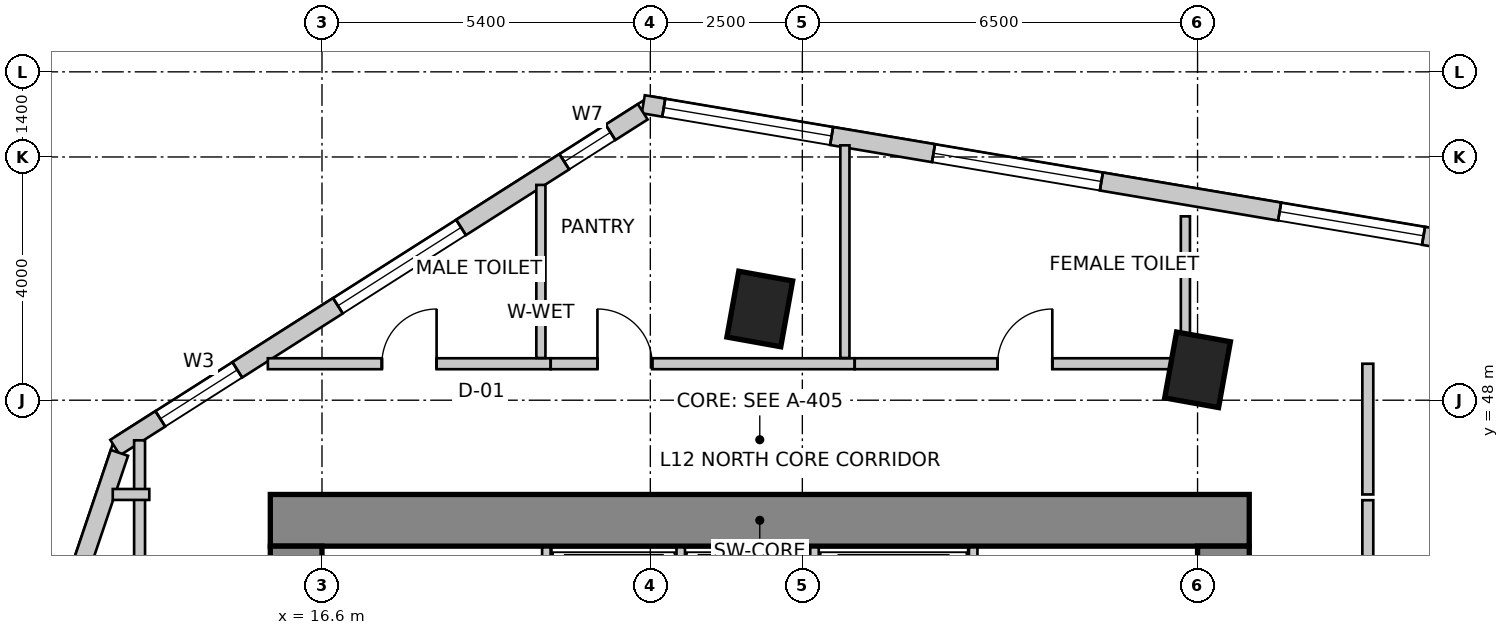
"""IFC4 building model, lengths in metres.
Left out: names, types, materials, properties, quantities, classifications, styles, units other than length and angle.
Written with IfcOpenShell. Run it as: python <this file> out.ifc"""

import sys

from ifc_helpers import new_model, si_unit, direction, frame, frame_2d, origin, origin_2d, place, context, subcontext, project, spatial, rectangle, extrude, source, transform, mapped, element, fill, save


model = new_model("IFC4")
c1 = context("Model", 3, precision=1e-05, world=origin(), true_north=direction((0.0, 1.0)))
c2 = subcontext(c1, "Body", "Model", "MODEL_VIEW")
j1 = project(units=[si_unit("LENGTHUNIT", "METRE"), si_unit("PLANEANGLEUNIT", "RADIAN")], contexts=[c1])
p1 = place(None, origin())
s1 = spatial("IfcSite", under=j1, at=p1, CompositionType="ELEMENT")
p2 = place(p1, origin())
s2 = spatial("IfcBuilding", under=s1, at=p2, CompositionType="ELEMENT")
p3 = place(p2, frame((0.0, 0.0, 51.0)))
s3 = spatial("IfcBuildingStorey", under=s2, at=p3, CompositionType="ELEMENT", Elevation=51.0)
p4 = place(p3, frame((15.75, 46.025, 0.0), z_axis=(0.0, 0.0, 1.0), x_axis=(1.0, 0.0, 0.0)))
e1 = element("IfcWall", 1, at=p4, inside=s3, PredefinedType="SHEAR", context=c2, shape_type="SweptSolid", body=[
    extrude(rectangle(XDim=16.1, YDim=0.85, at=frame_2d((8.05, 0.0))), origin(), (0.0, 0.0, 1.0), 4.0),
])
p5 = place(p3, frame((16.175, 34.2, 0.0), z_axis=(0.0, 0.0, 1.0), x_axis=(0.0, 1.0, 0.0)))
e2 = element("IfcWall", 2, at=p5, inside=s3, PredefinedType="SHEAR", context=c2, shape_type="SweptSolid", body=[
    extrude(rectangle(XDim=11.4, YDim=0.85, at=frame_2d((5.7, 0.0))), origin(), (0.0, 0.0, 1.0), 4.0),
])
m1 = source(origin(), c2, "Body", "SweptSolid", [
    extrude(rectangle(XDim=1.1, YDim=2.15, at=frame_2d((0.55, 1.075))), frame((0.0, 0.435, 0.0), z_axis=(0.0, -1.0, 0.0), x_axis=(1.0, 0.0, 0.0)), (0.0, 0.0, 1.0), 0.87),
])
p6 = place(p5, frame((7.15, 0.0, 0.0)))
e3 = element("IfcOpeningElement", 3, at=p6, cuts=e2, PredefinedType="OPENING", context=c2, shape_type="MappedRepresentation", body=[
    mapped(m1, transform((0.0, 0.0, 0.0), scale=1.0)),
])
p7 = place(p3, frame((31.425, 34.2, 0.0), z_axis=(0.0, 0.0, 1.0), x_axis=(0.0, 1.0, 0.0)))
e4 = element("IfcWall", 4, at=p7, inside=s3, PredefinedType="SHEAR", context=c2, shape_type="SweptSolid", body=[
    extrude(rectangle(XDim=11.4, YDim=0.85, at=frame_2d((5.7, 0.0))), origin(), (0.0, 0.0, 1.0), 4.0),
])
p8 = place(p7, frame((7.35, 0.0, 0.0)))
e5 = element("IfcOpeningElement", 5, at=p8, cuts=e4, PredefinedType="OPENING", context=c2, shape_type="MappedRepresentation", body=[
    mapped(m1, transform((0.0, 0.0, 0.0), scale=1.0)),
])
m2 = source(origin(), c2, "Body", "SweptSolid", [
    extrude(rectangle(XDim=0.9, YDim=1.1, at=origin_2d()), origin(), (0.0, 0.0, 1.0), 4.0),
])
for number, where, z_axis, x_axis in (
    (6, (23.8, 49.5, 0.0), (0.0, 0.0, 1.0), (0.984, -0.177, 0.0)),
    (7, (31.0, 48.5, 0.0), (0.0, 0.0, 1.0), (0.984, -0.177, 0.0)),
):
    element("IfcColumn", number, at=place(p3, frame(where, z_axis=z_axis, x_axis=x_axis)), inside=s3, PredefinedType="COLUMN", context=c2, shape_type="MappedRepresentation", body=[
        mapped(m2, transform((0.0, 0.0, 0.0), scale=1.0)),
    ])
p9 = place(p3, frame((58.761, 46.648, 0.0), z_axis=(0.0, 0.0, 1.0), x_axis=(-0.98607502735, 0.166301053624, 0.0)))
e8 = element("IfcWall", 8, at=p9, inside=s3, PredefinedType="SOLIDWALL", context=c2, shape_type="SweptSolid", body=[
    extrude(rectangle(XDim=37.397, YDim=0.3, at=frame_2d((18.699, 0.0))), origin(), (0.0, 0.0, 1.0), 3.75),
])
m3 = source(origin(), c2, "Body", "SweptSolid", [
    extrude(rectangle(XDim=2.4, YDim=2.2, at=frame_2d((1.2, 1.1))), frame((0.0, 0.16, 0.0), z_axis=(0.0, -1.0, 0.0), x_axis=(1.0, 0.0, 0.0)), (0.0, 0.0, 1.0), 0.32),
])
p10 = place(p9, frame((0.375, 0.0, 0.85)))
e9 = element("IfcOpeningElement", 9, at=p10, cuts=e8, PredefinedType="OPENING", context=c2, shape_type="MappedRepresentation", body=[
    mapped(m3, transform((0.0, 0.0, 0.0), scale=1.0)),
])
m4 = source(origin(), c2, "Body", "SweptSolid", [
    extrude(rectangle(XDim=2.8, YDim=2.4, at=frame_2d((1.4, 1.2))), frame((0.0, 0.16, 0.0), z_axis=(0.0, -1.0, 0.0), x_axis=(1.0, 0.0, 0.0)), (0.0, 0.0, 1.0), 0.32),
])
p11 = place(p9, frame((5.357, 0.0, 0.85)))
e10 = element("IfcOpeningElement", 10, at=p11, cuts=e8, PredefinedType="OPENING", context=c2, shape_type="MappedRepresentation", body=[
    mapped(m4, transform((0.0, 0.0, 0.0), scale=1.0)),
])
p12 = place(p9, frame((12.772, 0.0, 0.85)))
e11 = element("IfcOpeningElement", 11, at=p12, cuts=e8, PredefinedType="OPENING", context=c2, shape_type="MappedRepresentation", body=[
    mapped(m4, transform((0.0, 0.0, 0.0), scale=1.0)),
])
p13 = place(p9, frame((19.194, 0.0, 0.85)))
e12 = element("IfcOpeningElement", 12, at=p13, cuts=e8, PredefinedType="OPENING", context=c2, shape_type="MappedRepresentation", body=[
    mapped(m4, transform((0.0, 0.0, 0.0), scale=1.0)),
])
p14 = place(p9, frame((24.384, 0.0, 0.85)))
e13 = element("IfcOpeningElement", 13, at=p14, cuts=e8, PredefinedType="OPENING", context=c2, shape_type="MappedRepresentation", body=[
    mapped(m3, transform((0.0, 0.0, 0.0), scale=1.0)),
])
p15 = place(p9, frame((29.757, 0.0, 0.85)))
e14 = element("IfcOpeningElement", 14, at=p15, cuts=e8, PredefinedType="OPENING", context=c2, shape_type="MappedRepresentation", body=[
    mapped(m4, transform((0.0, 0.0, 0.0), scale=1.0)),
])
p16 = place(p9, frame((34.256, 0.0, 0.85)))
e15 = element("IfcOpeningElement", 15, at=p16, cuts=e8, PredefinedType="OPENING", context=c2, shape_type="MappedRepresentation", body=[
    mapped(m4, transform((0.0, 0.0, 0.0), scale=1.0)),
])
p17 = place(p3, frame((21.875, 52.743, 0.0), z_axis=(0.0, 0.0, 1.0), x_axis=(-0.843647802826, -0.536896996441, 0.0)))
e16 = element("IfcWall", 16, at=p17, inside=s3, PredefinedType="SOLIDWALL", context=c2, shape_type="SweptSolid", body=[
    extrude(rectangle(XDim=10.284, YDim=0.3, at=frame_2d((5.142, 0.0))), origin(), (0.0, 0.0, 1.0), 3.75),
])
m5 = source(origin(), c2, "Body", "SweptSolid", [
    extrude(rectangle(XDim=0.9, YDim=1.6, at=frame_2d((0.45, 0.8))), frame((0.0, 0.16, 0.0), z_axis=(0.0, -1.0, 0.0), x_axis=(1.0, 0.0, 0.0)), (0.0, 0.0, 1.0), 0.32),
])
p18 = place(p17, frame((0.629, 0.0, 0.85)))
e17 = element("IfcOpeningElement", 17, at=p18, cuts=e16, PredefinedType="OPENING", context=c2, shape_type="MappedRepresentation", body=[
    mapped(m5, transform((0.0, 0.0, 0.0), scale=1.0)),
])
p19 = place(p17, frame((3.542, 0.0, 0.85)))
e18 = element("IfcOpeningElement", 18, at=p19, cuts=e16, PredefinedType="OPENING", context=c2, shape_type="MappedRepresentation", body=[
    mapped(m3, transform((0.0, 0.0, 0.0), scale=1.0)),
])
m6 = source(origin(), c2, "Body", "SweptSolid", [
    extrude(rectangle(XDim=1.5, YDim=1.8, at=frame_2d((0.75, 0.9))), frame((0.0, 0.16, 0.0), z_axis=(0.0, -1.0, 0.0), x_axis=(1.0, 0.0, 0.0)), (0.0, 0.0, 1.0), 0.32),
])
p20 = place(p17, frame((7.904, 0.0, 0.85)))
e19 = element("IfcOpeningElement", 19, at=p20, cuts=e16, PredefinedType="OPENING", context=c2, shape_type="MappedRepresentation", body=[
    mapped(m6, transform((0.0, 0.0, 0.0), scale=1.0)),
])
p21 = place(p3, frame((13.269, 47.134, 0.0), z_axis=(0.0, 0.0, 1.0), x_axis=(-0.319920423265, -0.947444416722, 0.0)))
e20 = element("IfcWall", 20, at=p21, inside=s3, PredefinedType="SOLIDWALL", context=c2, shape_type="SweptSolid", body=[
    extrude(rectangle(XDim=16.135, YDim=0.3, at=frame_2d((8.067, 0.0))), origin(), (0.0, 0.0, 1.0), 3.75),
])
p22 = place(p21, frame((1.988, 0.0, 0.85)))
e21 = element("IfcOpeningElement", 21, at=p22, cuts=e20, PredefinedType="OPENING", context=c2, shape_type="MappedRepresentation", body=[
    mapped(m4, transform((0.0, 0.0, 0.0), scale=1.0)),
])
p23 = place(p21, frame((7.159, 0.0, 0.85)))
e22 = element("IfcOpeningElement", 22, at=p23, cuts=e20, PredefinedType="OPENING", context=c2, shape_type="MappedRepresentation", body=[
    mapped(m3, transform((0.0, 0.0, 0.0), scale=1.0)),
])
p24 = place(p21, frame((11.93, 0.0, 0.85)))
e23 = element("IfcOpeningElement", 23, at=p24, cuts=e20, PredefinedType="OPENING", context=c2, shape_type="MappedRepresentation", body=[
    mapped(m4, transform((0.0, 0.0, 0.0), scale=1.0)),
])
for number, where, z_axis, x_axis in (
    (24, (20.29, 43.28, 0.0), (0.0, 0.0, 1.0), (0.0, 1.0, 0.0)),
    (25, (27.31, 43.28, 0.0), (0.0, 0.0, 1.0), (0.0, 1.0, 0.0)),
):
    element("IfcWall", number, at=place(p3, frame(where, z_axis=z_axis, x_axis=x_axis)), inside=s3, PredefinedType="SOLIDWALL", context=c2, shape_type="SweptSolid", body=[
        extrude(rectangle(XDim=2.3, YDim=0.14, at=frame_2d((1.15, 0.0))), origin(), (0.0, 0.0, 1.0), 3.75),
    ])
for number, where, z_axis, x_axis in (
    (26, (22.5, 43.02, 0.0), (0.0, 0.0, 1.0), (0.0, 1.0, 0.0)),
    (27, (24.7, 43.02, 0.0), (0.0, 0.0, 1.0), (0.0, 1.0, 0.0)),
):
    element("IfcWall", number, at=place(p3, frame(where, z_axis=z_axis, x_axis=x_axis)), inside=s3, PredefinedType="SOLIDWALL", context=c2, shape_type="SweptSolid", body=[
        extrude(rectangle(XDim=2.56, YDim=0.14, at=frame_2d((1.28, 0.0))), origin(), (0.0, 0.0, 1.0), 3.75),
    ])
p25 = place(p3, frame((13.6, 33.444, 0.0), z_axis=(0.0, 0.0, 1.0), x_axis=(0.0, 1.0, 0.0)))
e28 = element("IfcWall", 28, at=p25, inside=s3, PredefinedType="PARTITIONING", context=c2, shape_type="SweptSolid", body=[
    extrude(rectangle(XDim=13.896, YDim=0.18, at=frame_2d((6.948, 0.0))), origin(), (0.0, 0.0, 1.0), 2.892),
])
m7 = source(origin(), c2, "Body", "SweptSolid", [
    extrude(rectangle(XDim=0.9, YDim=2.15, at=frame_2d((0.45, 1.075))), frame((0.0, 0.1, 0.0), z_axis=(0.0, -1.0, 0.0), x_axis=(1.0, 0.0, 0.0)), (0.0, 0.0, 1.0), 0.2),
])
p26 = place(p25, frame((4.144, 0.0, 0.0)))
e29 = element("IfcOpeningElement", 29, at=p26, cuts=e28, PredefinedType="OPENING", context=c2, shape_type="MappedRepresentation", body=[
    mapped(m7, transform((0.0, 0.0, 0.0), scale=1.0)),
])
p27 = place(p3, frame((13.76, 46.45, 0.0), z_axis=(0.0, 0.0, 1.0), x_axis=(-1.0, 0.0, 0.0)))
e30 = element("IfcWall", 30, at=p27, inside=s3, PredefinedType="PARTITIONING", context=c2, shape_type="SweptSolid", body=[
    extrude(rectangle(XDim=0.601, YDim=0.18, at=frame_2d((0.301, 0.0))), origin(), (0.0, 0.0, 1.0), 3.75),
])
p28 = place(p3, frame((15.71, 48.6, 0.0), z_axis=(0.0, 0.0, 1.0), x_axis=(1.0, 0.0, 0.0)))
e31 = element("IfcWall", 31, at=p28, inside=s3, PredefinedType="PARTITIONING", context=c2, shape_type="SweptSolid", body=[
    extrude(rectangle(XDim=4.65, YDim=0.18, at=frame_2d((2.325, 0.0))), origin(), (0.0, 0.0, 1.0), 3.75),
])
p29 = place(p28, frame((1.875, 0.0, 0.0)))
e32 = element("IfcOpeningElement", 32, at=p29, cuts=e31, PredefinedType="OPENING", context=c2, shape_type="MappedRepresentation", body=[
    mapped(m7, transform((0.0, 0.0, 0.0), scale=1.0)),
])
p30 = place(p3, frame((20.362, 48.6, 0.0), z_axis=(0.0, 0.0, 1.0), x_axis=(1.0, 0.0, 0.0)))
e33 = element("IfcWall", 33, at=p30, inside=s3, PredefinedType="PARTITIONING", context=c2, shape_type="SweptSolid", body=[
    extrude(rectangle(XDim=4.998, YDim=0.18, at=frame_2d((2.499, 0.0))), origin(), (0.0, 0.0, 1.0), 3.335),
])
p31 = place(p30, frame((0.768, 0.0, 0.0)))
e34 = element("IfcOpeningElement", 34, at=p31, cuts=e33, PredefinedType="OPENING", context=c2, shape_type="MappedRepresentation", body=[
    mapped(m7, transform((0.0, 0.0, 0.0), scale=1.0)),
])
p32 = place(p3, frame((25.362, 48.6, 0.0), z_axis=(0.0, 0.0, 1.0), x_axis=(1.0, 0.0, 0.0)))
e35 = element("IfcWall", 35, at=p32, inside=s3, PredefinedType="PARTITIONING", context=c2, shape_type="SweptSolid", body=[
    extrude(rectangle(XDim=5.598, YDim=0.18, at=frame_2d((2.799, 0.0))), origin(), (0.0, 0.0, 1.0), 2.892),
])
p33 = place(p32, frame((2.349, 0.0, 0.0)))
e36 = element("IfcOpeningElement", 36, at=p33, cuts=e35, PredefinedType="OPENING", context=c2, shape_type="MappedRepresentation", body=[
    mapped(m7, transform((0.0, 0.0, 0.0), scale=1.0)),
])
p34 = place(p3, frame((33.8, 48.6, 0.0), z_axis=(0.0, 0.0, 1.0), x_axis=(0.0, -1.0, 0.0)))
e37 = element("IfcWall", 37, at=p34, inside=s3, PredefinedType="PARTITIONING", context=c2, shape_type="SweptSolid", body=[
    extrude(rectangle(XDim=2.15, YDim=0.18, at=frame_2d((1.075, 0.0))), origin(), (0.0, 0.0, 1.0), 2.892),
])
p35 = place(p3, frame((33.8, 46.356, 0.0), z_axis=(0.0, 0.0, 1.0), x_axis=(0.0, -1.0, 0.0)))
e38 = element("IfcWall", 38, at=p35, inside=s3, PredefinedType="PARTITIONING", context=c2, shape_type="SweptSolid", body=[
    extrude(rectangle(XDim=8.516, YDim=0.18, at=frame_2d((4.258, 0.0))), origin(), (0.0, 0.0, 1.0), 3.188),
])
p36 = place(p3, frame((20.2, 51.54, 0.0), z_axis=(0.0, 0.0, 1.0), x_axis=(0.0, -1.0, 0.0)))
e39 = element("IfcWall", 39, at=p36, inside=s3, PredefinedType="PARTITIONING", context=c2, shape_type="SweptSolid", body=[
    extrude(rectangle(XDim=2.846, YDim=0.15, at=frame_2d((1.423, 0.0))), origin(), (0.0, 0.0, 1.0), 3.75),
])
p37 = place(p3, frame((25.2, 52.192, 0.0), z_axis=(0.0, 0.0, 1.0), x_axis=(0.0, -1.0, 0.0)))
e40 = element("IfcWall", 40, at=p37, inside=s3, PredefinedType="PARTITIONING", context=c2, shape_type="SweptSolid", body=[
    extrude(rectangle(XDim=3.498, YDim=0.15, at=frame_2d((1.749, 0.0))), origin(), (0.0, 0.0, 1.0), 2.892),
])
p38 = place(p3, frame((30.8, 51.024, 0.0), z_axis=(0.0, 0.0, 1.0), x_axis=(0.0, -1.0, 0.0)))
e41 = element("IfcWall", 41, at=p38, inside=s3, PredefinedType="PARTITIONING", context=c2, shape_type="SweptSolid", body=[
    extrude(rectangle(XDim=2.204, YDim=0.15, at=frame_2d((1.102, 0.0))), origin(), (0.0, 0.0, 1.0), 3.75),
])
m8 = source(origin(), c2, "Body", "SweptSolid", [
    extrude(rectangle(XDim=2.4, YDim=2.2, at=frame_2d((1.2, 1.1))), frame((0.0, -0.015, 0.0), z_axis=(0.0, -1.0, 0.0), x_axis=(1.0, 0.0, 0.0)), (0.0, 0.0, 1.0), 0.06),
])
p39 = place(p14, origin())
e42 = element("IfcWindow", 42, at=p39, inside=s3, PartitioningType="SINGLE_PANEL", PredefinedType="WINDOW", context=c2, shape_type="MappedRepresentation", body=[
    mapped(m8, transform((0.0, 0.0, 0.0), scale=1.0)),
])
fill(e13, e42)
m9 = source(origin(), c2, "Body", "SweptSolid", [
    extrude(rectangle(XDim=2.8, YDim=2.4, at=frame_2d((1.4, 1.2))), frame((0.0, -0.015, 0.0), z_axis=(0.0, -1.0, 0.0), x_axis=(1.0, 0.0, 0.0)), (0.0, 0.0, 1.0), 0.06),
])
p40 = place(p15, origin())
e43 = element("IfcWindow", 43, at=p40, inside=s3, PartitioningType="SINGLE_PANEL", PredefinedType="WINDOW", context=c2, shape_type="MappedRepresentation", body=[
    mapped(m9, transform((0.0, 0.0, 0.0), scale=1.0)),
])
fill(e14, e43)
p41 = place(p16, origin())
e44 = element("IfcWindow", 44, at=p41, inside=s3, PartitioningType="SINGLE_PANEL", PredefinedType="WINDOW", context=c2, shape_type="MappedRepresentation", body=[
    mapped(m9, transform((0.0, 0.0, 0.0), scale=1.0)),
])
fill(e15, e44)
m10 = source(origin(), c2, "Body", "SweptSolid", [
    extrude(rectangle(XDim=0.9, YDim=1.6, at=frame_2d((0.45, 0.8))), frame((0.0, -0.015, 0.0), z_axis=(0.0, -1.0, 0.0), x_axis=(1.0, 0.0, 0.0)), (0.0, 0.0, 1.0), 0.06),
])
p42 = place(p18, origin())
e45 = element("IfcWindow", 45, at=p42, inside=s3, PartitioningType="SINGLE_PANEL", PredefinedType="WINDOW", context=c2, shape_type="MappedRepresentation", body=[
    mapped(m10, transform((0.0, 0.0, 0.0), scale=1.0)),
])
fill(e17, e45)
p43 = place(p19, origin())
e46 = element("IfcWindow", 46, at=p43, inside=s3, PartitioningType="SINGLE_PANEL", PredefinedType="WINDOW", context=c2, shape_type="MappedRepresentation", body=[
    mapped(m8, transform((0.0, 0.0, 0.0), scale=1.0)),
])
fill(e18, e46)
m11 = source(origin(), c2, "Body", "SweptSolid", [
    extrude(rectangle(XDim=1.5, YDim=1.8, at=frame_2d((0.75, 0.9))), frame((0.0, -0.015, 0.0), z_axis=(0.0, -1.0, 0.0), x_axis=(1.0, 0.0, 0.0)), (0.0, 0.0, 1.0), 0.06),
])
p44 = place(p20, origin())
e47 = element("IfcWindow", 47, at=p44, inside=s3, PartitioningType="SINGLE_PANEL", PredefinedType="WINDOW", context=c2, shape_type="MappedRepresentation", body=[
    mapped(m11, transform((0.0, 0.0, 0.0), scale=1.0)),
])
fill(e19, e47)
m12 = source(origin(), c2, "Body", "SweptSolid", [
    extrude(rectangle(XDim=0.9, YDim=2.15, at=frame_2d((0.45, 1.075))), frame((0.0, 0.025, 0.0), z_axis=(0.0, -1.0, 0.0), x_axis=(1.0, 0.0, 0.0)), (0.0, 0.0, 1.0), 0.05),
])
p45 = place(p29, origin())
e48 = element("IfcDoor", 48, at=p45, inside=s3, OperationType="SINGLE_SWING_RIGHT", PredefinedType="DOOR", context=c2, shape_type="MappedRepresentation", body=[
    mapped(m12, transform((0.0, 0.0, 0.0), scale=1.0)),
])
fill(e32, e48)
p46 = place(p31, origin())
e49 = element("IfcDoor", 49, at=p46, inside=s3, OperationType="SINGLE_SWING_LEFT", PredefinedType="DOOR", context=c2, shape_type="MappedRepresentation", body=[
    mapped(m12, transform((0.0, 0.0, 0.0), scale=1.0)),
])
fill(e34, e49)
p47 = place(p33, origin())
e50 = element("IfcDoor", 50, at=p47, inside=s3, OperationType="SINGLE_SWING_RIGHT", PredefinedType="DOOR", context=c2, shape_type="MappedRepresentation", body=[
    mapped(m12, transform((0.0, 0.0, 0.0), scale=1.0)),
])
fill(e36, e50)
save(model, sys.argv[1])
